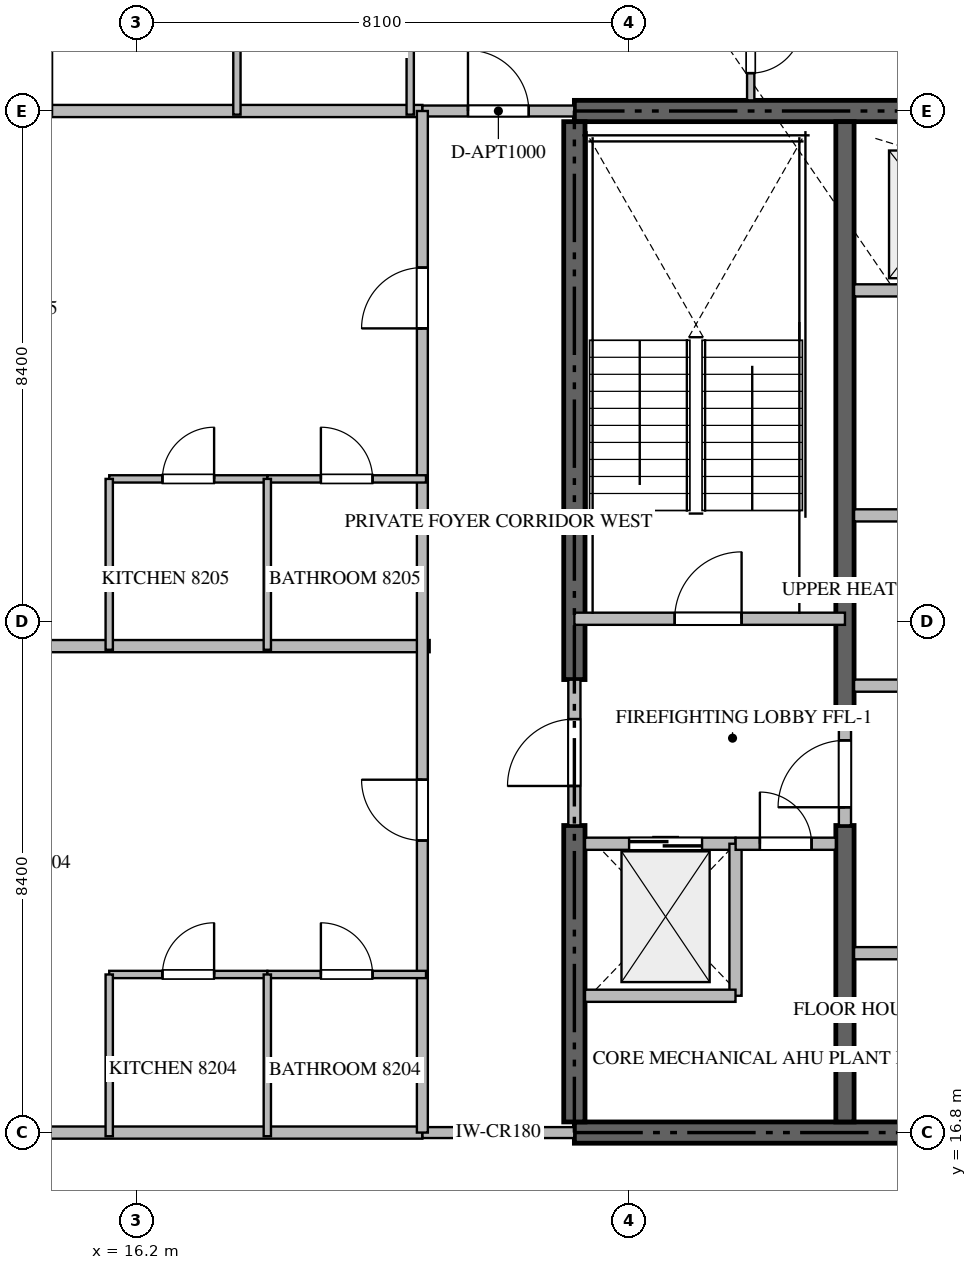
"""IFC4 building model, lengths in metres.
Left out: names, types, materials, properties, quantities, classifications, styles, units other than length and angle.
Written with IfcOpenShell. Run it as: python <this file> out.ifc"""

import sys

from ifc_helpers import new_model, si_unit, direction, frame, frame_2d, origin, place, context, subcontext, project, spatial, rectangle, extrude, source, transform, mapped, element, fill, save


model = new_model("IFC4")
c1 = context("Model", 3, precision=1e-05, world=origin(), true_north=direction((0.0, 1.0)))
c2 = subcontext(c1, "Body", "Model", "MODEL_VIEW")
j1 = project(units=[si_unit("LENGTHUNIT", "METRE"), si_unit("PLANEANGLEUNIT", "RADIAN")], contexts=[c1])
p1 = place(None, origin())
s1 = spatial("IfcSite", under=j1, at=p1, CompositionType="ELEMENT")
p2 = place(p1, origin())
s2 = spatial("IfcBuilding", under=s1, at=p2, CompositionType="ELEMENT")
p3 = place(p2, frame((0.0, 0.0, 329.9)))
s3 = spatial("IfcBuildingStorey", under=s2, at=p3, CompositionType="ELEMENT", Elevation=329.9)
for number, where, z_axis, x_axis in (
    (1, (23.4, 16.8, -0.26), (0.0, 0.0, 1.0), (1.0, 0.0, 0.0)),
    (2, (41.4, 33.6, -0.26), (0.0, 0.0, 1.0), (-1.0, 0.0, 0.0)),
):
    element("IfcWall", number, at=place(p3, frame(where, z_axis=z_axis, x_axis=x_axis)), inside=s3, PredefinedType="SHEAR", context=c2, shape_type="SweptSolid", body=[
        extrude(rectangle(XDim=18.0, YDim=0.35, at=frame_2d((9.0, 0.0))), origin(), (0.0, 0.0, 1.0), 4.048),
    ])
p4 = place(p3, frame((23.4, 16.975, -0.26), z_axis=(0.0, 0.0, 1.0), x_axis=(0.0, 1.0, 0.0)))
e3 = element("IfcWall", 3, at=p4, inside=s3, PredefinedType="SHEAR", context=c2, shape_type="SweptSolid", body=[
    extrude(rectangle(XDim=4.875, YDim=0.35, at=frame_2d((2.438, 0.0))), origin(), (0.0, 0.0, 1.0), 4.048),
])
p5 = place(p3, frame((23.4, 24.25, -0.26), z_axis=(0.0, 0.0, 1.0), x_axis=(0.0, 1.0, 0.0)))
e4 = element("IfcWall", 4, at=p5, inside=s3, PredefinedType="SHEAR", context=c2, shape_type="SweptSolid", body=[
    extrude(rectangle(XDim=9.175, YDim=0.35, at=frame_2d((4.587, 0.0))), origin(), (0.0, 0.0, 1.0), 4.048),
])
p6 = place(p3, frame((27.85, 16.975, -0.26), z_axis=(0.0, 0.0, 1.0), x_axis=(0.0, 1.0, 0.0)))
e5 = element("IfcWall", 5, at=p6, inside=s3, PredefinedType="SHEAR", context=c2, shape_type="SweptSolid", body=[
    extrude(rectangle(XDim=4.875, YDim=0.3, at=frame_2d((2.438, 0.0))), origin(), (0.0, 0.0, 1.0), 4.048),
])
p7 = place(p3, frame((27.85, 23.55, -0.26), z_axis=(0.0, 0.0, 1.0), x_axis=(0.0, 1.0, 0.0)))
e6 = element("IfcWall", 6, at=p7, inside=s3, PredefinedType="SHEAR", context=c2, shape_type="SweptSolid", body=[
    extrude(rectangle(XDim=9.875, YDim=0.3, at=frame_2d((4.938, 0.0))), origin(), (0.0, 0.0, 1.0), 4.048),
])
p8 = place(p3, frame((23.4, 25.25, 0.0), z_axis=(0.0, 0.0, 1.0), x_axis=(1.0, 0.0, 0.0)))
e7 = element("IfcWall", 7, at=p8, inside=s3, PredefinedType="STANDARD", context=c2, shape_type="SweptSolid", body=[
    extrude(rectangle(XDim=4.45, YDim=0.2, at=frame_2d((2.225, 0.0))), origin(), (0.0, 0.0, 1.0), 3.79),
])
p9 = place(p8, frame((1.65, 0.0, 0.0)))
e8 = element("IfcOpeningElement", 8, at=p9, cuts=e7, PredefinedType="OPENING", context=c2, shape_type="SweptSolid", body=[
    extrude(rectangle(XDim=1.1, YDim=2.15, at=frame_2d((0.55, 1.075))), frame((0.0, 0.11, 0.0), z_axis=(0.0, -1.0, 0.0), x_axis=(1.0, 0.0, 0.0)), (0.0, 0.0, 1.0), 0.22),
])
p10 = place(p3, frame((23.575, 21.55, 0.0), z_axis=(0.0, 0.0, 1.0), x_axis=(1.0, 0.0, 0.0)))
e9 = element("IfcWall", 9, at=p10, inside=s3, PredefinedType="STANDARD", context=c2, shape_type="SweptSolid", body=[
    extrude(rectangle(XDim=2.475, YDim=0.2, at=frame_2d((1.238, 0.0))), origin(), (0.0, 0.0, 1.0), 3.79),
])
p11 = place(p10, frame((0.725, 0.0, 0.0)))
e10 = element("IfcOpeningElement", 10, at=p11, cuts=e9, PredefinedType="OPENING", context=c2, shape_type="SweptSolid", body=[
    extrude(rectangle(XDim=1.2, YDim=2.2, at=frame_2d((0.6, 1.1))), frame((0.0, 0.11, 0.0), z_axis=(0.0, -1.0, 0.0), x_axis=(1.0, 0.0, 0.0)), (0.0, 0.0, 1.0), 0.22),
])
p12 = place(p3, frame((28.0, 30.65, 0.0), z_axis=(0.0, 0.0, 1.0), x_axis=(1.0, 0.0, 0.0)))
e11 = element("IfcWall", 11, at=p12, inside=s3, PredefinedType="STANDARD", context=c2, shape_type="SweptSolid", body=[
    extrude(rectangle(XDim=2.55, YDim=0.2, at=frame_2d((1.275, 0.0))), origin(), (0.0, 0.0, 1.0), 3.79),
])
p13 = place(p12, frame((0.85, 0.0, 0.0)))
e12 = element("IfcOpeningElement", 12, at=p13, cuts=e11, PredefinedType="OPENING", context=c2, shape_type="SweptSolid", body=[
    extrude(rectangle(XDim=1.1, YDim=2.2, at=frame_2d((0.55, 1.1))), frame((0.0, 0.11, 0.0), z_axis=(0.0, -1.0, 0.0), x_axis=(1.0, 0.0, 0.0)), (0.0, 0.0, 1.0), 0.22),
])
p14 = place(p3, frame((26.05, 19.05, 0.0), z_axis=(0.0, 0.0, 1.0), x_axis=(0.0, 1.0, 0.0)))
e13 = element("IfcWall", 13, at=p14, inside=s3, PredefinedType="STANDARD", context=c2, shape_type="SweptSolid", body=[
    extrude(rectangle(XDim=2.5, YDim=0.2, at=frame_2d((1.25, 0.0))), origin(), (0.0, 0.0, 1.0), 3.79),
])
p15 = place(p3, frame((23.575, 19.05, 0.0), z_axis=(0.0, 0.0, 1.0), x_axis=(1.0, 0.0, 0.0)))
e14 = element("IfcWall", 14, at=p15, inside=s3, PredefinedType="STANDARD", context=c2, shape_type="SweptSolid", body=[
    extrude(rectangle(XDim=2.475, YDim=0.2, at=frame_2d((1.238, 0.0))), origin(), (0.0, 0.0, 1.0), 3.79),
])
p16 = place(p3, frame((26.052, 21.55, 0.0), z_axis=(0.0, 0.0, 1.0), x_axis=(1.0, 0.0, 0.0)))
e15 = element("IfcWall", 15, at=p16, inside=s3, PredefinedType="STANDARD", context=c2, shape_type="SweptSolid", body=[
    extrude(rectangle(XDim=1.648, YDim=0.2, at=frame_2d((0.824, 0.0))), origin(), (0.0, 0.0, 1.0), 3.79),
])
p17 = place(p16, frame((0.399, 0.0, 0.0)))
e16 = element("IfcOpeningElement", 16, at=p17, cuts=e15, PredefinedType="OPENING", context=c2, shape_type="SweptSolid", body=[
    extrude(rectangle(XDim=0.85, YDim=2.1, at=frame_2d((0.425, 1.05))), frame((0.0, 0.11, 0.0), z_axis=(0.0, -1.0, 0.0), x_axis=(1.0, 0.0, 0.0)), (0.0, 0.0, 1.0), 0.22),
])
p18 = place(p3, frame((23.4, 21.852, 0.0), z_axis=(0.0, 0.0, 1.0), x_axis=(0.0, 1.0, 0.0)))
e17 = element("IfcWall", 17, at=p18, inside=s3, PredefinedType="STANDARD", context=c2, shape_type="SweptSolid", body=[
    extrude(rectangle(XDim=2.396, YDim=0.2, at=frame_2d((1.198, 0.0))), origin(), (0.0, 0.0, 1.0), 3.79),
])
p19 = place(p18, frame((0.648, 0.0, 0.0)))
e18 = element("IfcOpeningElement", 18, at=p19, cuts=e17, PredefinedType="OPENING", context=c2, shape_type="SweptSolid", body=[
    extrude(rectangle(XDim=1.1, YDim=2.15, at=frame_2d((0.55, 1.075))), frame((0.0, 0.11, 0.0), z_axis=(0.0, -1.0, 0.0), x_axis=(1.0, 0.0, 0.0)), (0.0, 0.0, 1.0), 0.22),
])
p20 = place(p3, frame((27.85, 21.852, 0.0), z_axis=(0.0, 0.0, 1.0), x_axis=(0.0, 1.0, 0.0)))
e19 = element("IfcWall", 19, at=p20, inside=s3, PredefinedType="STANDARD", context=c2, shape_type="SweptSolid", body=[
    extrude(rectangle(XDim=1.696, YDim=0.2, at=frame_2d((0.848, 0.0))), origin(), (0.0, 0.0, 1.0), 3.79),
])
p21 = place(p20, frame((0.298, 0.0, 0.0)))
e20 = element("IfcOpeningElement", 20, at=p21, cuts=e19, PredefinedType="OPENING", context=c2, shape_type="SweptSolid", body=[
    extrude(rectangle(XDim=1.1, YDim=2.15, at=frame_2d((0.55, 1.075))), frame((0.0, 0.11, 0.0), z_axis=(0.0, -1.0, 0.0), x_axis=(1.0, 0.0, 0.0)), (0.0, 0.0, 1.0), 0.22),
])
p22 = place(p3, frame((28.0, 19.75, 0.0), z_axis=(0.0, 0.0, 1.0), x_axis=(1.0, 0.0, 0.0)))
e21 = element("IfcWall", 21, at=p22, inside=s3, PredefinedType="STANDARD", context=c2, shape_type="SweptSolid", body=[
    extrude(rectangle(XDim=3.9, YDim=0.2, at=frame_2d((1.95, 0.0))), origin(), (0.0, 0.0, 1.0), 3.79),
])
p23 = place(p22, frame((1.5, 0.0, 0.0)))
e22 = element("IfcOpeningElement", 22, at=p23, cuts=e21, PredefinedType="OPENING", context=c2, shape_type="SweptSolid", body=[
    extrude(rectangle(XDim=0.9, YDim=2.1, at=frame_2d((0.45, 1.05))), frame((0.0, 0.11, 0.0), z_axis=(0.0, -1.0, 0.0), x_axis=(1.0, 0.0, 0.0)), (0.0, 0.0, 1.0), 0.22),
])
p24 = place(p3, frame((28.0, 26.95, 0.0), z_axis=(0.0, 0.0, 1.0), x_axis=(1.0, 0.0, 0.0)))
e23 = element("IfcWall", 23, at=p24, inside=s3, PredefinedType="STANDARD", context=c2, shape_type="SweptSolid", body=[
    extrude(rectangle(XDim=6.95, YDim=0.2, at=frame_2d((3.475, 0.0))), origin(), (0.0, 0.0, 1.0), 3.79),
])
p25 = place(p3, frame((28.0, 24.15, 0.0), z_axis=(0.0, 0.0, 1.0), x_axis=(1.0, 0.0, 0.0)))
e24 = element("IfcWall", 24, at=p25, inside=s3, PredefinedType="STANDARD", context=c2, shape_type="SweptSolid", body=[
    extrude(rectangle(XDim=6.95, YDim=0.2, at=frame_2d((3.475, 0.0))), origin(), (0.0, 0.0, 1.0), 3.79),
])
p26 = place(p25, frame((3.025, 0.0, 0.0)))
e25 = element("IfcOpeningElement", 25, at=p26, cuts=e24, PredefinedType="OPENING", context=c2, shape_type="SweptSolid", body=[
    extrude(rectangle(XDim=0.9, YDim=2.1, at=frame_2d((0.45, 1.05))), frame((0.0, 0.11, 0.0), z_axis=(0.0, -1.0, 0.0), x_axis=(1.0, 0.0, 0.0)), (0.0, 0.0, 1.0), 0.22),
])
p27 = place(p3, frame((9.282, 24.8, 0.0), z_axis=(0.0, 0.0, 1.0), x_axis=(1.0, 0.0, 0.0)))
e26 = element("IfcWall", 26, at=p27, inside=s3, PredefinedType="PARTITIONING", context=c2, shape_type="SweptSolid", body=[
    extrude(rectangle(XDim=11.738, YDim=0.2, at=frame_2d((5.869, 0.0))), origin(), (0.0, 0.0, 1.0), 3.79),
])
for number, where, z_axis, x_axis in (
    (27, (9.282, 16.8, 0.0), (0.0, 0.0, 1.0), (1.0, 0.0, 0.0)),
    (28, (9.282, 33.6, 0.0), (0.0, 0.0, 1.0), (1.0, 0.0, 0.0)),
):
    element("IfcWall", number, at=place(p3, frame(where, z_axis=z_axis, x_axis=x_axis)), inside=s3, PredefinedType="PARTITIONING", context=c2, shape_type="SweptSolid", body=[
        extrude(rectangle(XDim=11.618, YDim=0.2, at=frame_2d((5.809, 0.0))), origin(), (0.0, 0.0, 1.0), 3.79),
    ])
p28 = place(p3, frame((20.902, 16.8, 0.0), z_axis=(0.0, 0.0, 1.0), x_axis=(1.0, 0.0, 0.0)))
e29 = element("IfcWall", 29, at=p28, inside=s3, PredefinedType="PARTITIONING", context=c2, shape_type="SweptSolid", body=[
    extrude(rectangle(XDim=2.496, YDim=0.18, at=frame_2d((1.248, 0.0))), origin(), (0.0, 0.0, 1.0), 3.79),
])
p29 = place(p3, frame((20.902, 33.6, 0.0), z_axis=(0.0, 0.0, 1.0), x_axis=(1.0, 0.0, 0.0)))
e30 = element("IfcWall", 30, at=p29, inside=s3, PredefinedType="PARTITIONING", context=c2, shape_type="SweptSolid", body=[
    extrude(rectangle(XDim=2.496, YDim=0.18, at=frame_2d((1.248, 0.0))), origin(), (0.0, 0.0, 1.0), 3.79),
])
p30 = place(p29, frame((0.748, 0.0, 0.0)))
e31 = element("IfcOpeningElement", 31, at=p30, cuts=e30, PredefinedType="OPENING", context=c2, shape_type="SweptSolid", body=[
    extrude(rectangle(XDim=1.0, YDim=2.15, at=frame_2d((0.5, 1.075))), frame((0.0, 0.1, 0.0), z_axis=(0.0, -1.0, 0.0), x_axis=(1.0, 0.0, 0.0)), (0.0, 0.0, 1.0), 0.2),
])
p31 = place(p3, frame((20.9, 16.8, 0.0), z_axis=(0.0, 0.0, 1.0), x_axis=(0.0, 1.0, 0.0)))
e32 = element("IfcWall", 32, at=p31, inside=s3, PredefinedType="PARTITIONING", context=c2, shape_type="SweptSolid", body=[
    extrude(rectangle(XDim=16.8, YDim=0.18, at=frame_2d((8.4, 0.0))), origin(), (0.0, 0.0, 1.0), 3.79),
])
p32 = place(p31, frame((4.803, 0.0, 0.0)))
e33 = element("IfcOpeningElement", 33, at=p32, cuts=e32, PredefinedType="OPENING", context=c2, shape_type="SweptSolid", body=[
    extrude(rectangle(XDim=1.0, YDim=2.15, at=frame_2d((0.5, 1.075))), frame((0.0, 0.1, 0.0), z_axis=(0.0, -1.0, 0.0), x_axis=(1.0, 0.0, 0.0)), (0.0, 0.0, 1.0), 0.2),
])
p33 = place(p31, frame((13.225, 0.0, 0.0)))
e34 = element("IfcOpeningElement", 34, at=p33, cuts=e32, PredefinedType="OPENING", context=c2, shape_type="SweptSolid", body=[
    extrude(rectangle(XDim=1.0, YDim=2.15, at=frame_2d((0.5, 1.075))), frame((0.0, 0.1, 0.0), z_axis=(0.0, -1.0, 0.0), x_axis=(1.0, 0.0, 0.0)), (0.0, 0.0, 1.0), 0.2),
])
p34 = place(p3, frame((20.7, 36.35, 0.0), z_axis=(0.0, 0.0, 1.0), x_axis=(0.0, -1.0, 0.0)))
e35 = element("IfcWall", 35, at=p34, inside=s3, PredefinedType="PARTITIONING", context=c2, shape_type="SweptSolid", body=[
    extrude(rectangle(XDim=2.81, YDim=0.12, at=frame_2d((1.405, 0.0))), origin(), (0.0, 0.0, 1.0), 3.79),
])
p35 = place(p3, frame((14.75, 37.807, 0.0), z_axis=(0.0, 0.0, 1.0), x_axis=(0.0, -1.0, 0.0)))
e36 = element("IfcWall", 36, at=p35, inside=s3, PredefinedType="PARTITIONING", context=c2, shape_type="SweptSolid", body=[
    extrude(rectangle(XDim=4.267, YDim=0.12, at=frame_2d((2.133, 0.0))), origin(), (0.0, 0.0, 1.0), 3.79),
])
p36 = place(p3, frame((17.85, 37.805, 0.0), z_axis=(0.0, 0.0, 1.0), x_axis=(0.0, -1.0, 0.0)))
e37 = element("IfcWall", 37, at=p36, inside=s3, PredefinedType="PARTITIONING", context=c2, shape_type="SweptSolid", body=[
    extrude(rectangle(XDim=4.265, YDim=0.12, at=frame_2d((2.132, 0.0))), origin(), (0.0, 0.0, 1.0), 3.372),
])
p37 = place(p36, frame((1.848, 0.0, 0.0)))
e38 = element("IfcOpeningElement", 38, at=p37, cuts=e37, PredefinedType="OPENING", context=c2, shape_type="SweptSolid", body=[
    extrude(rectangle(XDim=0.85, YDim=2.1, at=frame_2d((0.425, 1.05))), frame((0.0, 0.07, 0.0), z_axis=(0.0, -1.0, 0.0), x_axis=(1.0, 0.0, 0.0)), (0.0, 0.0, 1.0), 0.14),
])
p38 = place(p3, frame((26.3, 35.648, 0.0), z_axis=(0.0, 0.0, 1.0), x_axis=(0.0, -1.0, 0.0)))
e39 = element("IfcWall", 39, at=p38, inside=s3, PredefinedType="PARTITIONING", context=c2, shape_type="SweptSolid", body=[
    extrude(rectangle(XDim=1.873, YDim=0.12, at=frame_2d((0.937, 0.0))), origin(), (0.0, 0.0, 1.0), 3.79),
])
p39 = place(p38, frame((0.575, 0.0, 0.0)))
e40 = element("IfcOpeningElement", 40, at=p39, cuts=e39, PredefinedType="OPENING", context=c2, shape_type="SweptSolid", body=[
    extrude(rectangle(XDim=0.85, YDim=2.1, at=frame_2d((0.425, 1.05))), frame((0.0, 0.07, 0.0), z_axis=(0.0, -1.0, 0.0), x_axis=(1.0, 0.0, 0.0)), (0.0, 0.0, 1.0), 0.14),
])
p40 = place(p3, frame((15.75, 19.4, 0.0), z_axis=(0.0, 0.0, 1.0), x_axis=(1.0, 0.0, 0.0)))
e41 = element("IfcWall", 41, at=p40, inside=s3, PredefinedType="PARTITIONING", context=c2, shape_type="SweptSolid", body=[
    extrude(rectangle(XDim=2.6, YDim=0.12, at=frame_2d((1.3, 0.0))), origin(), (0.0, 0.0, 1.0), 3.79),
])
p41 = place(p40, frame((0.875, 0.0, 0.0)))
e42 = element("IfcOpeningElement", 42, at=p41, cuts=e41, PredefinedType="OPENING", context=c2, shape_type="SweptSolid", body=[
    extrude(rectangle(XDim=0.85, YDim=2.1, at=frame_2d((0.425, 1.05))), frame((0.0, 0.07, 0.0), z_axis=(0.0, -1.0, 0.0), x_axis=(1.0, 0.0, 0.0)), (0.0, 0.0, 1.0), 0.14),
])
p42 = place(p3, frame((18.352, 19.4, 0.0), z_axis=(0.0, 0.0, 1.0), x_axis=(1.0, 0.0, 0.0)))
e43 = element("IfcWall", 43, at=p42, inside=s3, PredefinedType="PARTITIONING", context=c2, shape_type="SweptSolid", body=[
    extrude(rectangle(XDim=2.608, YDim=0.12, at=frame_2d((1.304, 0.0))), origin(), (0.0, 0.0, 1.0), 3.79),
])
p43 = place(p42, frame((0.879, 0.0, 0.0)))
e44 = element("IfcOpeningElement", 44, at=p43, cuts=e43, PredefinedType="OPENING", context=c2, shape_type="SweptSolid", body=[
    extrude(rectangle(XDim=0.85, YDim=2.1, at=frame_2d((0.425, 1.05))), frame((0.0, 0.07, 0.0), z_axis=(0.0, -1.0, 0.0), x_axis=(1.0, 0.0, 0.0)), (0.0, 0.0, 1.0), 0.14),
])
for number, where, z_axis, x_axis in (
    (45, (18.35, 16.74, 0.0), (0.0, 0.0, 1.0), (0.0, 1.0, 0.0)),
    (46, (15.75, 16.74, 0.0), (0.0, 0.0, 1.0), (0.0, 1.0, 0.0)),
):
    element("IfcWall", number, at=place(p3, frame(where, z_axis=z_axis, x_axis=x_axis)), inside=s3, PredefinedType="PARTITIONING", context=c2, shape_type="SweptSolid", body=[
        extrude(rectangle(XDim=2.66, YDim=0.12, at=frame_2d((1.33, 0.0))), origin(), (0.0, 0.0, 1.0), 3.79),
    ])
p44 = place(p3, frame((15.75, 27.55, 0.0), z_axis=(0.0, 0.0, 1.0), x_axis=(1.0, 0.0, 0.0)))
e47 = element("IfcWall", 47, at=p44, inside=s3, PredefinedType="PARTITIONING", context=c2, shape_type="SweptSolid", body=[
    extrude(rectangle(XDim=2.6, YDim=0.12, at=frame_2d((1.3, 0.0))), origin(), (0.0, 0.0, 1.0), 3.79),
])
p45 = place(p44, frame((0.875, 0.0, 0.0)))
e48 = element("IfcOpeningElement", 48, at=p45, cuts=e47, PredefinedType="OPENING", context=c2, shape_type="SweptSolid", body=[
    extrude(rectangle(XDim=0.85, YDim=2.1, at=frame_2d((0.425, 1.05))), frame((0.0, 0.07, 0.0), z_axis=(0.0, -1.0, 0.0), x_axis=(1.0, 0.0, 0.0)), (0.0, 0.0, 1.0), 0.14),
])
p46 = place(p3, frame((18.352, 27.55, 0.0), z_axis=(0.0, 0.0, 1.0), x_axis=(1.0, 0.0, 0.0)))
e49 = element("IfcWall", 49, at=p46, inside=s3, PredefinedType="PARTITIONING", context=c2, shape_type="SweptSolid", body=[
    extrude(rectangle(XDim=2.608, YDim=0.12, at=frame_2d((1.304, 0.0))), origin(), (0.0, 0.0, 1.0), 3.79),
])
p47 = place(p46, frame((0.879, 0.0, 0.0)))
e50 = element("IfcOpeningElement", 50, at=p47, cuts=e49, PredefinedType="OPENING", context=c2, shape_type="SweptSolid", body=[
    extrude(rectangle(XDim=0.85, YDim=2.1, at=frame_2d((0.425, 1.05))), frame((0.0, 0.07, 0.0), z_axis=(0.0, -1.0, 0.0), x_axis=(1.0, 0.0, 0.0)), (0.0, 0.0, 1.0), 0.14),
])
for number, where, z_axis, x_axis in (
    (51, (18.35, 24.74, 0.0), (0.0, 0.0, 1.0), (0.0, 1.0, 0.0)),
    (52, (15.75, 24.74, 0.0), (0.0, 0.0, 1.0), (0.0, 1.0, 0.0)),
):
    element("IfcWall", number, at=place(p3, frame(where, z_axis=z_axis, x_axis=x_axis)), inside=s3, PredefinedType="PARTITIONING", context=c2, shape_type="SweptSolid", body=[
        extrude(rectangle(XDim=2.81, YDim=0.12, at=frame_2d((1.405, 0.0))), origin(), (0.0, 0.0, 1.0), 3.79),
    ])
m1 = source(origin(), c2, "Body", "SweptSolid", [
    extrude(rectangle(XDim=1.1, YDim=2.15, at=frame_2d((0.55, 1.075))), frame((0.0, 0.025, 0.0), z_axis=(0.0, -1.0, 0.0), x_axis=(1.0, 0.0, 0.0)), (0.0, 0.0, 1.0), 0.05),
])
p48 = place(p9, origin())
e53 = element("IfcDoor", 53, at=p48, inside=s3, OperationType="SINGLE_SWING_RIGHT", PredefinedType="DOOR", context=c2, shape_type="MappedRepresentation", body=[
    mapped(m1, transform((0.0, 0.0, 0.0), scale=1.0)),
])
fill(e8, e53)
m2 = source(origin(), c2, "Body", "SweptSolid", [
    extrude(rectangle(XDim=1.2, YDim=2.2, at=frame_2d((0.6, 1.1))), frame((0.0, 0.025, 0.0), z_axis=(0.0, -1.0, 0.0), x_axis=(1.0, 0.0, 0.0)), (0.0, 0.0, 1.0), 0.05),
])
p49 = place(p11, origin())
e54 = element("IfcDoor", 54, at=p49, inside=s3, OperationType="DOUBLE_DOOR_SLIDING", PredefinedType="DOOR", context=c2, shape_type="MappedRepresentation", body=[
    mapped(m2, transform((0.0, 0.0, 0.0), scale=1.0)),
])
fill(e10, e54)
m3 = source(origin(), c2, "Body", "SweptSolid", [
    extrude(rectangle(XDim=0.85, YDim=2.1, at=frame_2d((0.425, 1.05))), frame((0.0, 0.025, 0.0), z_axis=(0.0, -1.0, 0.0), x_axis=(1.0, 0.0, 0.0)), (0.0, 0.0, 1.0), 0.05),
])
p50 = place(p17, origin())
e55 = element("IfcDoor", 55, at=p50, inside=s3, OperationType="SINGLE_SWING_LEFT", PredefinedType="DOOR", context=c2, shape_type="MappedRepresentation", body=[
    mapped(m3, transform((0.0, 0.0, 0.0), scale=1.0)),
])
fill(e16, e55)
p51 = place(p19, origin())
e56 = element("IfcDoor", 56, at=p51, inside=s3, OperationType="SINGLE_SWING_LEFT", PredefinedType="DOOR", context=c2, shape_type="MappedRepresentation", body=[
    mapped(m1, transform((0.0, 0.0, 0.0), scale=1.0)),
])
fill(e18, e56)
p52 = place(p21, origin())
e57 = element("IfcDoor", 57, at=p52, inside=s3, OperationType="SINGLE_SWING_LEFT", PredefinedType="DOOR", context=c2, shape_type="MappedRepresentation", body=[
    mapped(m1, transform((0.0, 0.0, 0.0), scale=1.0)),
])
fill(e20, e57)
m4 = source(origin(), c2, "Body", "SweptSolid", [
    extrude(rectangle(XDim=1.0, YDim=2.15, at=frame_2d((0.5, 1.075))), frame((0.0, 0.025, 0.0), z_axis=(0.0, -1.0, 0.0), x_axis=(1.0, 0.0, 0.0)), (0.0, 0.0, 1.0), 0.05),
])
p53 = place(p30, origin())
e58 = element("IfcDoor", 58, at=p53, inside=s3, OperationType="SINGLE_SWING_LEFT", PredefinedType="DOOR", context=c2, shape_type="MappedRepresentation", body=[
    mapped(m4, transform((0.0, 0.0, 0.0), scale=1.0)),
])
fill(e31, e58)
p54 = place(p32, origin())
e59 = element("IfcDoor", 59, at=p54, inside=s3, OperationType="SINGLE_SWING_RIGHT", PredefinedType="DOOR", context=c2, shape_type="MappedRepresentation", body=[
    mapped(m4, transform((0.0, 0.0, 0.0), scale=1.0)),
])
fill(e33, e59)
p55 = place(p33, origin())
e60 = element("IfcDoor", 60, at=p55, inside=s3, OperationType="SINGLE_SWING_LEFT", PredefinedType="DOOR", context=c2, shape_type="MappedRepresentation", body=[
    mapped(m4, transform((0.0, 0.0, 0.0), scale=1.0)),
])
fill(e34, e60)
p56 = place(p39, origin())
e61 = element("IfcDoor", 61, at=p56, inside=s3, OperationType="SINGLE_SWING_LEFT", PredefinedType="DOOR", context=c2, shape_type="MappedRepresentation", body=[
    mapped(m3, transform((0.0, 0.0, 0.0), scale=1.0)),
])
fill(e40, e61)
p57 = place(p41, origin())
e62 = element("IfcDoor", 62, at=p57, inside=s3, OperationType="SINGLE_SWING_RIGHT", PredefinedType="DOOR", context=c2, shape_type="MappedRepresentation", body=[
    mapped(m3, transform((0.0, 0.0, 0.0), scale=1.0)),
])
fill(e42, e62)
p58 = place(p43, origin())
e63 = element("IfcDoor", 63, at=p58, inside=s3, OperationType="SINGLE_SWING_LEFT", PredefinedType="DOOR", context=c2, shape_type="MappedRepresentation", body=[
    mapped(m3, transform((0.0, 0.0, 0.0), scale=1.0)),
])
fill(e44, e63)
p59 = place(p45, origin())
e64 = element("IfcDoor", 64, at=p59, inside=s3, OperationType="SINGLE_SWING_RIGHT", PredefinedType="DOOR", context=c2, shape_type="MappedRepresentation", body=[
    mapped(m3, transform((0.0, 0.0, 0.0), scale=1.0)),
])
fill(e48, e64)
p60 = place(p47, origin())
e65 = element("IfcDoor", 65, at=p60, inside=s3, OperationType="SINGLE_SWING_LEFT", PredefinedType="DOOR", context=c2, shape_type="MappedRepresentation", body=[
    mapped(m3, transform((0.0, 0.0, 0.0), scale=1.0)),
])
fill(e50, e65)
save(model, sys.argv[1])
